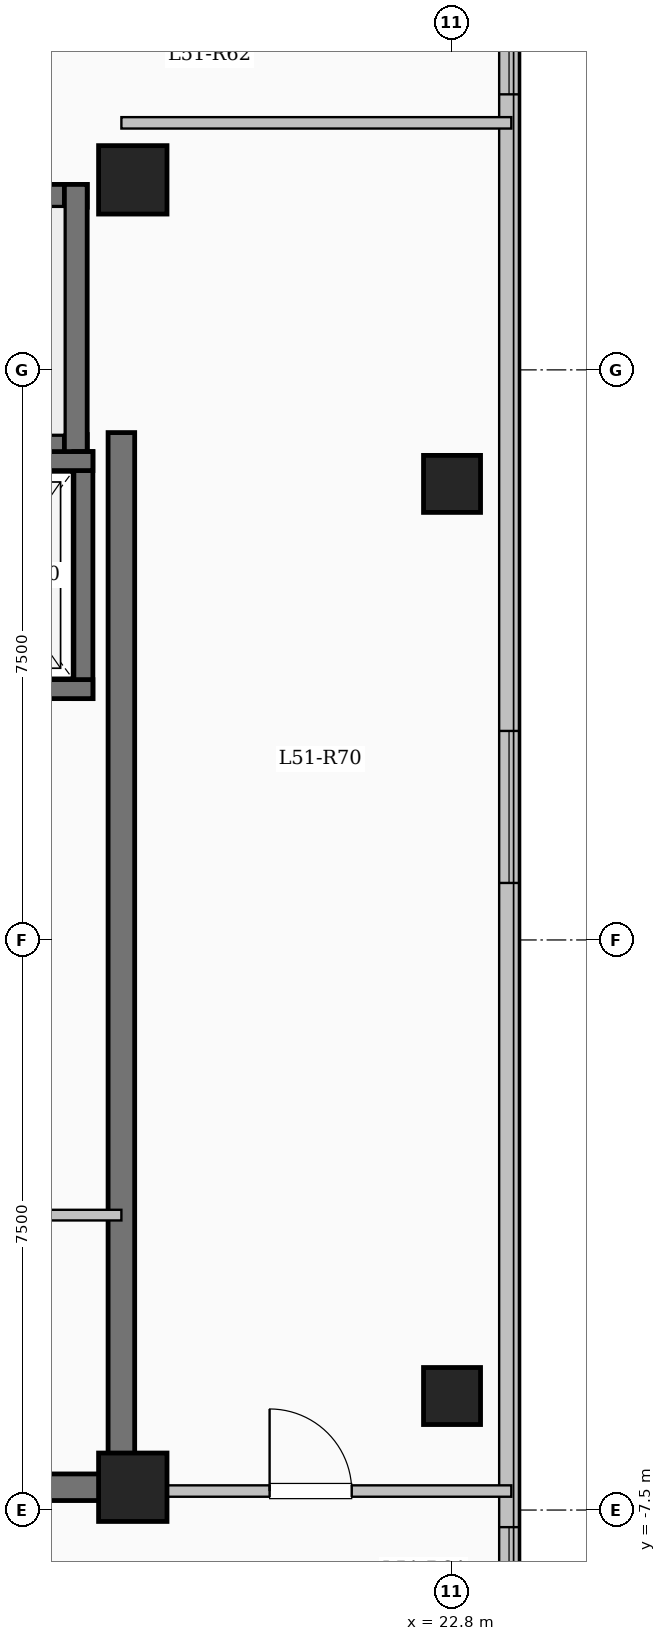
"""IFC4 building model, lengths in metres.
Left out: names, types, materials, properties, quantities, classifications, styles, units other than length and angle.
Written with IfcOpenShell. Run it as: python <this file> out.ifc"""

import sys

from ifc_helpers import new_model, si_unit, direction, frame, frame_2d, origin, origin_2d, place, context, subcontext, project, spatial, rectangle, extrude, element, fill, save


model = new_model("IFC4")
c1 = context("Model", 3, precision=1e-05, world=origin(), true_north=direction((0.0, 1.0)))
c2 = subcontext(c1, "Body", "Model", "MODEL_VIEW")
j1 = project(units=[si_unit("LENGTHUNIT", "METRE"), si_unit("PLANEANGLEUNIT", "RADIAN")], contexts=[c1])
p1 = place(None, origin())
s1 = spatial("IfcSite", under=j1, at=p1, CompositionType="ELEMENT")
p2 = place(p1, origin())
s2 = spatial("IfcBuilding", under=s1, at=p2, CompositionType="ELEMENT")
p3 = place(p2, frame((0.0, 0.0, 190.25)))
s3 = spatial("IfcBuildingStorey", under=s2, at=p3, CompositionType="ELEMENT", Elevation=190.25)
for number, where, z_axis, x_axis in (
    (1, (18.6, -7.2, 0.0), (0.0, 0.0, 1.0), (1.0, 0.0, 0.0)),
    (2, (18.6, 10.0, 0.0), (0.0, 0.0, 1.0), (1.0, 0.0, 0.0)),
):
    element("IfcColumn", number, at=place(p3, frame(where, z_axis=z_axis, x_axis=x_axis)), inside=s3, PredefinedType="COLUMN", context=c2, shape_type="SweptSolid", body=[
        extrude(rectangle(XDim=0.9, YDim=0.9, at=origin_2d()), origin(), (0.0, 0.0, 1.0), 3.35),
    ])
for number, where, z_axis, x_axis in (
    (3, (22.8, -6.0, 0.0), (0.0, 0.0, 1.0), (1.0, 0.0, 0.0)),
    (4, (22.8, 6.0, 0.0), (0.0, 0.0, 1.0), (1.0, 0.0, 0.0)),
):
    element("IfcColumn", number, at=place(p3, frame(where, z_axis=z_axis, x_axis=x_axis)), inside=s3, PredefinedType="COLUMN", context=c2, shape_type="SweptSolid", body=[
        extrude(rectangle(XDim=0.75, YDim=0.75, at=origin_2d()), origin(), (0.0, 0.0, 1.0), 3.35),
    ])
p4 = place(p3, frame((23.55, 17.25, 0.0), z_axis=(0.0, 0.0, 1.0), x_axis=(0.0, -1.0, 0.0)))
e5 = element("IfcWall", 5, at=p4, inside=s3, PredefinedType="SOLIDWALL", context=c2, shape_type="SweptSolid", body=[
    extrude(rectangle(XDim=34.5, YDim=0.26, at=frame_2d((17.25, 0.0))), origin(), (0.0, 0.0, 1.0), 3.1),
])
p5 = place(p4, frame((1.375, 0.0, 0.9)))
e6 = element("IfcOpeningElement", 6, at=p5, cuts=e5, PredefinedType="OPENING", context=c2, shape_type="SweptSolid", body=[
    extrude(rectangle(XDim=2.0, YDim=1.7, at=frame_2d((1.0, 0.85))), frame((0.0, 0.14, 0.0), z_axis=(0.0, -1.0, 0.0), x_axis=(1.0, 0.0, 0.0)), (0.0, 0.0, 1.0), 0.28),
])
p6 = place(p4, frame((5.125, 0.0, 0.95)))
e7 = element("IfcOpeningElement", 7, at=p6, cuts=e5, PredefinedType="OPENING", context=c2, shape_type="SweptSolid", body=[
    extrude(rectangle(XDim=1.0, YDim=1.5, at=frame_2d((0.5, 0.75))), frame((0.0, 0.14, 0.0), z_axis=(0.0, -1.0, 0.0), x_axis=(1.0, 0.0, 0.0)), (0.0, 0.0, 1.0), 0.28),
])
p7 = place(p4, frame((14.5, 0.0, 0.9)))
e8 = element("IfcOpeningElement", 8, at=p7, cuts=e5, PredefinedType="OPENING", context=c2, shape_type="SweptSolid", body=[
    extrude(rectangle(XDim=2.0, YDim=1.7, at=frame_2d((1.0, 0.85))), frame((0.0, 0.14, 0.0), z_axis=(0.0, -1.0, 0.0), x_axis=(1.0, 0.0, 0.0)), (0.0, 0.0, 1.0), 0.28),
])
p8 = place(p4, frame((24.975, 0.0, 0.95)))
e9 = element("IfcOpeningElement", 9, at=p8, cuts=e5, PredefinedType="OPENING", context=c2, shape_type="SweptSolid", body=[
    extrude(rectangle(XDim=1.2, YDim=1.5, at=frame_2d((0.6, 0.75))), frame((0.0, 0.14, 0.0), z_axis=(0.0, -1.0, 0.0), x_axis=(1.0, 0.0, 0.0)), (0.0, 0.0, 1.0), 0.28),
])
p9 = place(p4, frame((29.475, 0.0, 0.9)))
e10 = element("IfcOpeningElement", 10, at=p9, cuts=e5, PredefinedType="OPENING", context=c2, shape_type="SweptSolid", body=[
    extrude(rectangle(XDim=2.2, YDim=1.75, at=frame_2d((1.1, 0.875))), frame((0.0, 0.14, 0.0), z_axis=(0.0, -1.0, 0.0), x_axis=(1.0, 0.0, 0.0)), (0.0, 0.0, 1.0), 0.28),
])
p10 = place(p3, frame((10.0, 9.79, 0.0), z_axis=(0.0, 0.0, 1.0), x_axis=(1.0, 0.0, 0.0)))
e11 = element("IfcWall", 11, at=p10, inside=s3, PredefinedType="SHEAR", context=c2, shape_type="SweptSolid", body=[
    extrude(rectangle(XDim=8.0, YDim=0.3, at=frame_2d((4.0, 0.0))), origin(), (0.0, 0.0, 1.0), 3.35),
])
p11 = place(p3, frame((10.0, 6.5, 0.0), z_axis=(0.0, 0.0, 1.0), x_axis=(1.0, 0.0, 0.0)))
e12 = element("IfcWall", 12, at=p11, inside=s3, PredefinedType="SHEAR", context=c2, shape_type="SweptSolid", body=[
    extrude(rectangle(XDim=8.0, YDim=0.3, at=frame_2d((4.0, 0.0))), origin(), (0.0, 0.0, 1.0), 3.35),
])
p12 = place(p11, frame((0.55, 0.0, 0.0)))
e13 = element("IfcOpeningElement", 13, at=p12, cuts=e12, PredefinedType="OPENING", context=c2, shape_type="SweptSolid", body=[
    extrude(rectangle(XDim=1.0, YDim=2.15, at=frame_2d((0.5, 1.075))), frame((0.0, 0.16, 0.0), z_axis=(0.0, -1.0, 0.0), x_axis=(1.0, 0.0, 0.0)), (0.0, 0.0, 1.0), 0.32),
])
p13 = place(p3, frame((17.85, 6.35, 0.0), z_axis=(0.0, 0.0, 1.0), x_axis=(0.0, 1.0, 0.0)))
e14 = element("IfcWall", 14, at=p13, inside=s3, PredefinedType="SHEAR", context=c2, shape_type="SweptSolid", body=[
    extrude(rectangle(XDim=3.59, YDim=0.3, at=frame_2d((1.795, 0.0))), origin(), (0.0, 0.0, 1.0), 3.35),
])
p14 = place(p3, frame((17.95, 3.175, 0.0), z_axis=(0.0, 0.0, 1.0), x_axis=(0.0, 1.0, 0.0)))
e15 = element("IfcWall", 15, at=p14, inside=s3, PredefinedType="SHEAR", context=c2, shape_type="SweptSolid", body=[
    extrude(rectangle(XDim=3.25, YDim=0.25, at=frame_2d((1.625, 0.0))), origin(), (0.0, 0.0, 1.0), 3.35),
])
for number, where, z_axis, x_axis in (
    (16, (15.525, 3.3, 0.0), (0.0, 0.0, 1.0), (1.0, 0.0, 0.0)),
    (17, (15.525, 6.3, 0.0), (0.0, 0.0, 1.0), (1.0, 0.0, 0.0)),
):
    element("IfcWall", number, at=place(p3, frame(where, z_axis=z_axis, x_axis=x_axis)), inside=s3, PredefinedType="SHEAR", context=c2, shape_type="SweptSolid", body=[
        extrude(rectangle(XDim=2.55, YDim=0.25, at=frame_2d((1.275, 0.0))), origin(), (0.0, 0.0, 1.0), 3.35),
    ])
p15 = place(p3, frame((18.45, -7.375, 0.0), z_axis=(0.0, 0.0, 1.0), x_axis=(0.0, 1.0, 0.0)))
e18 = element("IfcWall", 18, at=p15, inside=s3, PredefinedType="SHEAR", context=c2, shape_type="SweptSolid", body=[
    extrude(rectangle(XDim=14.05, YDim=0.35, at=frame_2d((7.025, 0.0))), origin(), (0.0, 0.0, 1.0), 3.35),
])
p16 = place(p3, frame((12.625, -7.2, 0.0), z_axis=(0.0, 0.0, 1.0), x_axis=(1.0, 0.0, 0.0)))
e19 = element("IfcWall", 19, at=p16, inside=s3, PredefinedType="SHEAR", context=c2, shape_type="SweptSolid", body=[
    extrude(rectangle(XDim=6.0, YDim=0.35, at=frame_2d((3.0, 0.0))), origin(), (0.0, 0.0, 1.0), 3.35),
])
p17 = place(p3, frame((15.4, -3.62, 0.0), z_axis=(0.0, 0.0, 1.0), x_axis=(1.0, 0.0, 0.0)))
e20 = element("IfcWall", 20, at=p17, inside=s3, PredefinedType="PARTITIONING", context=c2, shape_type="SweptSolid", body=[
    extrude(rectangle(XDim=3.05, YDim=0.14, at=frame_2d((1.525, 0.0))), origin(), (0.0, 0.0, 1.0), 3.1),
])
p18 = place(p17, frame((1.05, 0.0, 0.0)))
e21 = element("IfcOpeningElement", 21, at=p18, cuts=e20, PredefinedType="OPENING", context=c2, shape_type="SweptSolid", body=[
    extrude(rectangle(XDim=0.9, YDim=2.08, at=frame_2d((0.45, 1.04))), frame((0.0, 0.08, 0.0), z_axis=(0.0, -1.0, 0.0), x_axis=(1.0, 0.0, 0.0)), (0.0, 0.0, 1.0), 0.16),
])
p19 = place(p3, frame((18.45, -7.25, 0.0), z_axis=(0.0, 0.0, 1.0), x_axis=(1.0, 0.0, 0.0)))
e22 = element("IfcWall", 22, at=p19, inside=s3, PredefinedType="PARTITIONING", context=c2, shape_type="SweptSolid", body=[
    extrude(rectangle(XDim=5.13, YDim=0.15, at=frame_2d((2.565, 0.0))), origin(), (0.0, 0.0, 1.0), 3.1),
])
p20 = place(p19, frame((1.95, 0.0, 0.0)))
e23 = element("IfcOpeningElement", 23, at=p20, cuts=e22, PredefinedType="OPENING", context=c2, shape_type="SweptSolid", body=[
    extrude(rectangle(XDim=1.08, YDim=2.15, at=frame_2d((0.54, 1.075))), frame((0.0, 0.085, 0.0), z_axis=(0.0, -1.0, 0.0), x_axis=(1.0, 0.0, 0.0)), (0.0, 0.0, 1.0), 0.17),
])
p21 = place(p3, frame((18.45, 10.75, 0.0), z_axis=(0.0, 0.0, 1.0), x_axis=(1.0, 0.0, 0.0)))
e24 = element("IfcWall", 24, at=p21, inside=s3, PredefinedType="PARTITIONING", context=c2, shape_type="SweptSolid", body=[
    extrude(rectangle(XDim=5.13, YDim=0.15, at=frame_2d((2.565, 0.0))), origin(), (0.0, 0.0, 1.0), 3.1),
])
p22 = place(p6, origin())
e25 = element("IfcWindow", 25, at=p22, inside=s3, PartitioningType="SINGLE_PANEL", PredefinedType="WINDOW", context=c2, shape_type="SweptSolid", body=[
    extrude(rectangle(XDim=1.0, YDim=1.5, at=frame_2d((0.5, 0.75))), frame((0.0, 0.03, 0.0), z_axis=(0.0, -1.0, 0.0), x_axis=(1.0, 0.0, 0.0)), (0.0, 0.0, 1.0), 0.06),
])
fill(e7, e25)
p23 = place(p7, origin())
e26 = element("IfcWindow", 26, at=p23, inside=s3, PartitioningType="SINGLE_PANEL", PredefinedType="WINDOW", context=c2, shape_type="SweptSolid", body=[
    extrude(rectangle(XDim=2.0, YDim=1.7, at=frame_2d((1.0, 0.85))), frame((0.0, 0.03, 0.0), z_axis=(0.0, -1.0, 0.0), x_axis=(1.0, 0.0, 0.0)), (0.0, 0.0, 1.0), 0.06),
])
fill(e8, e26)
p24 = place(p8, origin())
e27 = element("IfcWindow", 27, at=p24, inside=s3, PartitioningType="SINGLE_PANEL", PredefinedType="WINDOW", context=c2, shape_type="SweptSolid", body=[
    extrude(rectangle(XDim=1.2, YDim=1.5, at=frame_2d((0.6, 0.75))), frame((0.0, 0.03, 0.0), z_axis=(0.0, -1.0, 0.0), x_axis=(1.0, 0.0, 0.0)), (0.0, 0.0, 1.0), 0.06),
])
fill(e9, e27)
p25 = place(p20, origin())
e28 = element("IfcDoor", 28, at=p25, inside=s3, OperationType="SINGLE_SWING_LEFT", PredefinedType="DOOR", context=c2, shape_type="SweptSolid", body=[
    extrude(rectangle(XDim=1.08, YDim=2.15, at=frame_2d((0.54, 1.075))), frame((0.0, 0.025, 0.0), z_axis=(0.0, -1.0, 0.0), x_axis=(1.0, 0.0, 0.0)), (0.0, 0.0, 1.0), 0.05),
])
fill(e23, e28)
save(model, sys.argv[1])
